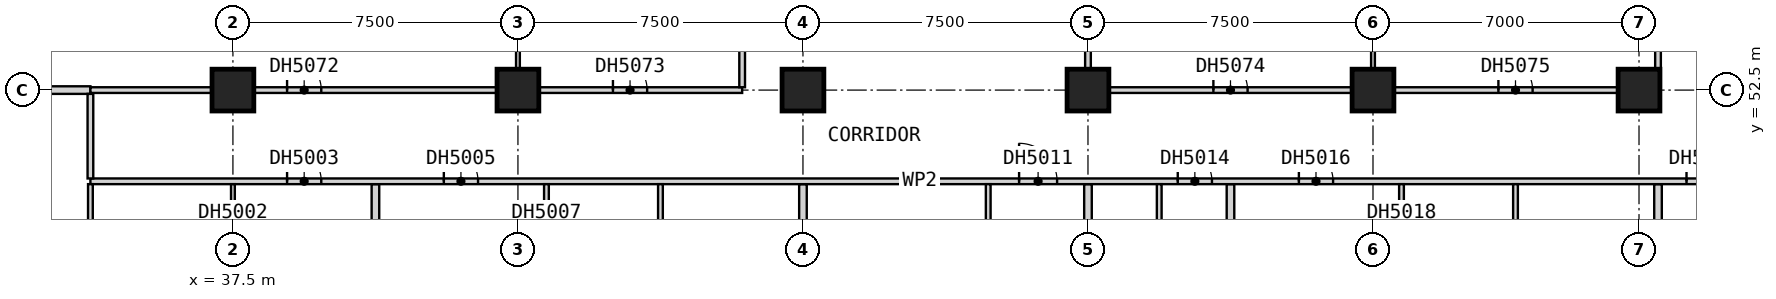
"""IFC4 building model, lengths in metres.
Left out: names, types, materials, properties, quantities, classifications, styles, units other than length and angle.
Written with IfcOpenShell. Run it as: python <this file> out.ifc"""

import sys

from ifc_helpers import new_model, si_unit, direction, frame, frame_2d, origin, origin_2d, place, context, subcontext, project, spatial, rectangle, extrude, element, fill, save


model = new_model("IFC4")
c1 = context("Model", 3, precision=1e-05, world=origin(), true_north=direction((0.0, 1.0)))
c2 = subcontext(c1, "Body", "Model", "MODEL_VIEW")
j1 = project(units=[si_unit("LENGTHUNIT", "METRE"), si_unit("PLANEANGLEUNIT", "RADIAN")], contexts=[c1])
p1 = place(None, origin())
s1 = spatial("IfcSite", under=j1, at=p1, CompositionType="ELEMENT")
p2 = place(p1, origin())
s2 = spatial("IfcBuilding", under=s1, at=p2, CompositionType="ELEMENT")
p3 = place(p2, frame((0.0, 0.0, 93.5)))
s3 = spatial("IfcBuildingStorey", under=s2, at=p3, CompositionType="ELEMENT", Elevation=93.5)
for number, where, z_axis, x_axis in (
    (1, (37.5, 52.5, 0.0), (0.0, 0.0, 1.0), (1.0, 0.0, 0.0)),
    (2, (45.0, 52.5, 0.0), (0.0, 0.0, 1.0), (1.0, 0.0, 0.0)),
    (3, (52.5, 52.5, 0.0), (0.0, 0.0, 1.0), (1.0, 0.0, 0.0)),
    (4, (60.0, 52.5, 0.0), (0.0, 0.0, 1.0), (1.0, 0.0, 0.0)),
    (5, (67.5, 52.5, 0.0), (0.0, 0.0, 1.0), (1.0, 0.0, 0.0)),
    (6, (74.5, 52.5, 0.0), (0.0, 0.0, 1.0), (1.0, 0.0, 0.0)),
):
    element("IfcColumn", number, at=place(p3, frame(where, z_axis=z_axis, x_axis=x_axis)), inside=s3, PredefinedType="COLUMN", context=c2, shape_type="SweptSolid", body=[
        extrude(rectangle(XDim=1.1, YDim=1.1, at=origin_2d()), origin(), (0.0, 0.0, 1.0), 3.6),
    ])
p4 = place(p3, frame((30.0, 52.5, 0.0), z_axis=(0.0, 0.0, 1.0), x_axis=(1.0, 0.0, 0.0)))
e7 = element("IfcWall", 7, at=p4, inside=s3, PredefinedType="PARTITIONING", context=c2, shape_type="SweptSolid", body=[
    extrude(rectangle(XDim=3.75, YDim=0.2, at=frame_2d((1.875, 0.0))), origin(), (0.0, 0.0, 1.0), 3.35),
])
p5 = place(p3, frame((41.25, 38.31, 0.0), z_axis=(0.0, 0.0, 1.0), x_axis=(0.0, 1.0, 0.0)))
e8 = element("IfcWall", 8, at=p5, inside=s3, PredefinedType="PARTITIONING", context=c2, shape_type="SweptSolid", body=[
    extrude(rectangle(XDim=11.715, YDim=0.2, at=frame_2d((5.857, 0.0))), origin(), (0.0, 0.0, 1.0), 3.35),
])
for number, where, z_axis, x_axis in (
    (9, (52.5, 37.5, 0.0), (0.0, 0.0, 1.0), (0.0, 1.0, 0.0)),
    (10, (60.0, 37.5, 0.0), (0.0, 0.0, 1.0), (0.0, 1.0, 0.0)),
):
    element("IfcWall", number, at=place(p3, frame(where, z_axis=z_axis, x_axis=x_axis)), inside=s3, PredefinedType="PARTITIONING", context=c2, shape_type="SweptSolid", body=[
        extrude(rectangle(XDim=12.525, YDim=0.2, at=frame_2d((6.262, 0.0))), origin(), (0.0, 0.0, 1.0), 3.35),
    ])
for number, where, z_axis, x_axis in (
    (11, (63.75, 38.31, 0.0), (0.0, 0.0, 1.0), (0.0, 1.0, 0.0)),
    (12, (75.0, 38.31, 0.0), (0.0, 0.0, 1.0), (0.0, 1.0, 0.0)),
):
    element("IfcWall", number, at=place(p3, frame(where, z_axis=z_axis, x_axis=x_axis)), inside=s3, PredefinedType="PARTITIONING", context=c2, shape_type="SweptSolid", body=[
        extrude(rectangle(XDim=11.715, YDim=0.2, at=frame_2d((5.857, 0.0))), origin(), (0.0, 0.0, 1.0), 3.35),
    ])
p6 = place(p3, frame((33.75, 50.1, 0.0), z_axis=(0.0, 0.0, 1.0), x_axis=(1.0, 0.0, 0.0)))
e13 = element("IfcWall", 13, at=p6, inside=s3, PredefinedType="PARTITIONING", context=c2, shape_type="SweptSolid", body=[
    extrude(rectangle(XDim=43.65, YDim=0.15, at=frame_2d((21.825, 0.0))), origin(), (0.0, 0.0, 1.0), 3.35),
])
p7 = place(p6, frame((5.175, 0.0, 0.0)))
e14 = element("IfcOpeningElement", 14, at=p7, cuts=e13, PredefinedType="OPENING", context=c2, shape_type="SweptSolid", body=[
    extrude(rectangle(XDim=0.9, YDim=2.1, at=frame_2d((0.45, 1.05))), frame((0.0, 0.085, 0.0), z_axis=(0.0, -1.0, 0.0), x_axis=(1.0, 0.0, 0.0)), (0.0, 0.0, 1.0), 0.17),
])
p8 = place(p6, frame((9.3, 0.0, 0.0)))
e15 = element("IfcOpeningElement", 15, at=p8, cuts=e13, PredefinedType="OPENING", context=c2, shape_type="SweptSolid", body=[
    extrude(rectangle(XDim=0.9, YDim=2.1, at=frame_2d((0.45, 1.05))), frame((0.0, 0.085, 0.0), z_axis=(0.0, -1.0, 0.0), x_axis=(1.0, 0.0, 0.0)), (0.0, 0.0, 1.0), 0.17),
])
p9 = place(p6, frame((24.438, 0.0, 0.0)))
e16 = element("IfcOpeningElement", 16, at=p9, cuts=e13, PredefinedType="OPENING", context=c2, shape_type="SweptSolid", body=[
    extrude(rectangle(XDim=1.0, YDim=2.1, at=frame_2d((0.5, 1.05))), frame((0.0, 0.085, 0.0), z_axis=(0.0, -1.0, 0.0), x_axis=(1.0, 0.0, 0.0)), (0.0, 0.0, 1.0), 0.17),
])
p10 = place(p6, frame((28.613, 0.0, 0.0)))
e17 = element("IfcOpeningElement", 17, at=p10, cuts=e13, PredefinedType="OPENING", context=c2, shape_type="SweptSolid", body=[
    extrude(rectangle(XDim=0.9, YDim=2.1, at=frame_2d((0.45, 1.05))), frame((0.0, 0.085, 0.0), z_axis=(0.0, -1.0, 0.0), x_axis=(1.0, 0.0, 0.0)), (0.0, 0.0, 1.0), 0.17),
])
p11 = place(p6, frame((31.8, 0.0, 0.0)))
e18 = element("IfcOpeningElement", 18, at=p11, cuts=e13, PredefinedType="OPENING", context=c2, shape_type="SweptSolid", body=[
    extrude(rectangle(XDim=0.9, YDim=2.1, at=frame_2d((0.45, 1.05))), frame((0.0, 0.085, 0.0), z_axis=(0.0, -1.0, 0.0), x_axis=(1.0, 0.0, 0.0)), (0.0, 0.0, 1.0), 0.17),
])
p12 = place(p6, frame((42.0, 0.0, 0.0)))
e19 = element("IfcOpeningElement", 19, at=p12, cuts=e13, PredefinedType="OPENING", context=c2, shape_type="SweptSolid", body=[
    extrude(rectangle(XDim=0.9, YDim=2.1, at=frame_2d((0.45, 1.05))), frame((0.0, 0.085, 0.0), z_axis=(0.0, -1.0, 0.0), x_axis=(1.0, 0.0, 0.0)), (0.0, 0.0, 1.0), 0.17),
])
p13 = place(p3, frame((33.75, 52.5, 0.0), z_axis=(0.0, 0.0, 1.0), x_axis=(1.0, 0.0, 0.0)))
e20 = element("IfcWall", 20, at=p13, inside=s3, PredefinedType="PARTITIONING", context=c2, shape_type="SweptSolid", body=[
    extrude(rectangle(XDim=17.15, YDim=0.15, at=frame_2d((8.575, 0.0))), origin(), (0.0, 0.0, 1.0), 3.35),
])
p14 = place(p13, frame((5.175, 0.0, 0.0)))
e21 = element("IfcOpeningElement", 21, at=p14, cuts=e20, PredefinedType="OPENING", context=c2, shape_type="SweptSolid", body=[
    extrude(rectangle(XDim=0.9, YDim=2.1, at=frame_2d((0.45, 1.05))), frame((0.0, 0.085, 0.0), z_axis=(0.0, -1.0, 0.0), x_axis=(1.0, 0.0, 0.0)), (0.0, 0.0, 1.0), 0.17),
])
p15 = place(p13, frame((13.75, 0.0, 0.0)))
e22 = element("IfcOpeningElement", 22, at=p15, cuts=e20, PredefinedType="OPENING", context=c2, shape_type="SweptSolid", body=[
    extrude(rectangle(XDim=0.9, YDim=2.1, at=frame_2d((0.45, 1.05))), frame((0.0, 0.085, 0.0), z_axis=(0.0, -1.0, 0.0), x_axis=(1.0, 0.0, 0.0)), (0.0, 0.0, 1.0), 0.17),
])
p16 = place(p3, frame((60.0, 52.5, 0.0), z_axis=(0.0, 0.0, 1.0), x_axis=(1.0, 0.0, 0.0)))
e23 = element("IfcWall", 23, at=p16, inside=s3, PredefinedType="PARTITIONING", context=c2, shape_type="SweptSolid", body=[
    extrude(rectangle(XDim=15.0, YDim=0.15, at=frame_2d((7.5, 0.0))), origin(), (0.0, 0.0, 1.0), 3.35),
])
p17 = place(p16, frame((3.3, 0.0, 0.0)))
e24 = element("IfcOpeningElement", 24, at=p17, cuts=e23, PredefinedType="OPENING", context=c2, shape_type="SweptSolid", body=[
    extrude(rectangle(XDim=0.9, YDim=2.1, at=frame_2d((0.45, 1.05))), frame((0.0, 0.085, 0.0), z_axis=(0.0, -1.0, 0.0), x_axis=(1.0, 0.0, 0.0)), (0.0, 0.0, 1.0), 0.17),
])
p18 = place(p16, frame((10.8, 0.0, 0.0)))
e25 = element("IfcOpeningElement", 25, at=p18, cuts=e23, PredefinedType="OPENING", context=c2, shape_type="SweptSolid", body=[
    extrude(rectangle(XDim=0.9, YDim=2.1, at=frame_2d((0.45, 1.05))), frame((0.0, 0.085, 0.0), z_axis=(0.0, -1.0, 0.0), x_axis=(1.0, 0.0, 0.0)), (0.0, 0.0, 1.0), 0.17),
])
p19 = place(p3, frame((33.75, 50.175, 0.0), z_axis=(0.0, 0.0, 1.0), x_axis=(0.0, 1.0, 0.0)))
e26 = element("IfcWall", 26, at=p19, inside=s3, PredefinedType="PARTITIONING", context=c2, shape_type="SweptSolid", body=[
    extrude(rectangle(XDim=2.225, YDim=0.15, at=frame_2d((1.112, 0.0))), origin(), (0.0, 0.0, 1.0), 3.35),
])
p20 = place(p3, frame((75.0, 52.575, 0.0), z_axis=(0.0, 0.0, 1.0), x_axis=(0.0, 1.0, 0.0)))
e27 = element("IfcWall", 27, at=p20, inside=s3, PredefinedType="PARTITIONING", context=c2, shape_type="SweptSolid", body=[
    extrude(rectangle(XDim=11.85, YDim=0.15, at=frame_2d((5.925, 0.0))), origin(), (0.0, 0.0, 1.0), 3.35),
])
p21 = place(p20, frame((9.225, 0.0, 0.0)))
e28 = element("IfcOpeningElement", 28, at=p21, cuts=e27, PredefinedType="OPENING", context=c2, shape_type="SweptSolid", body=[
    extrude(rectangle(XDim=0.9, YDim=2.1, at=frame_2d((0.45, 1.05))), frame((0.0, 0.085, 0.0), z_axis=(0.0, -1.0, 0.0), x_axis=(1.0, 0.0, 0.0)), (0.0, 0.0, 1.0), 0.17),
])
p22 = place(p3, frame((37.5, 45.3, 0.0), z_axis=(0.0, 0.0, 1.0), x_axis=(0.0, 1.0, 0.0)))
e29 = element("IfcWall", 29, at=p22, inside=s3, PredefinedType="PARTITIONING", context=c2, shape_type="SweptSolid", body=[
    extrude(rectangle(XDim=4.725, YDim=0.1, at=frame_2d((2.362, 0.0))), origin(), (0.0, 0.0, 1.0), 3.35),
])
p23 = place(p22, frame((1.925, 0.0, 0.0)))
e30 = element("IfcOpeningElement", 30, at=p23, cuts=e29, PredefinedType="OPENING", context=c2, shape_type="SweptSolid", body=[
    extrude(rectangle(XDim=0.9, YDim=2.1, at=frame_2d((0.45, 1.05))), frame((0.0, 0.06, 0.0), z_axis=(0.0, -1.0, 0.0), x_axis=(1.0, 0.0, 0.0)), (0.0, 0.0, 1.0), 0.12),
])
p24 = place(p3, frame((45.0, 52.575, 0.0), z_axis=(0.0, 0.0, 1.0), x_axis=(0.0, 1.0, 0.0)))
e31 = element("IfcWall", 31, at=p24, inside=s3, PredefinedType="PARTITIONING", context=c2, shape_type="SweptSolid", body=[
    extrude(rectangle(XDim=7.425, YDim=0.1, at=frame_2d((3.712, 0.0))), origin(), (0.0, 0.0, 1.0), 3.35),
])
p25 = place(p3, frame((67.5, 52.575, 0.0), z_axis=(0.0, 0.0, 1.0), x_axis=(0.0, 1.0, 0.0)))
e32 = element("IfcWall", 32, at=p25, inside=s3, PredefinedType="PARTITIONING", context=c2, shape_type="SweptSolid", body=[
    extrude(rectangle(XDim=7.375, YDim=0.1, at=frame_2d((3.688, 0.0))), origin(), (0.0, 0.0, 1.0), 3.35),
])
p26 = place(p3, frame((33.75, 45.312, 0.0), z_axis=(0.0, 0.0, 1.0), x_axis=(0.0, 1.0, 0.0)))
e33 = element("IfcWall", 33, at=p26, inside=s3, PredefinedType="PARTITIONING", context=c2, shape_type="SweptSolid", body=[
    extrude(rectangle(XDim=4.712, YDim=0.125, at=frame_2d((2.356, 0.0))), origin(), (0.0, 0.0, 1.0), 3.35),
])
p27 = place(p3, frame((45.75, 45.312, 0.0), z_axis=(0.0, 0.0, 1.0), x_axis=(0.0, 1.0, 0.0)))
e34 = element("IfcWall", 34, at=p27, inside=s3, PredefinedType="PARTITIONING", context=c2, shape_type="SweptSolid", body=[
    extrude(rectangle(XDim=4.712, YDim=0.125, at=frame_2d((2.356, 0.0))), origin(), (0.0, 0.0, 1.0), 3.35),
])
p28 = place(p27, frame((1.913, 0.0, 0.0)))
e35 = element("IfcOpeningElement", 35, at=p28, cuts=e34, PredefinedType="OPENING", context=c2, shape_type="SweptSolid", body=[
    extrude(rectangle(XDim=0.9, YDim=2.1, at=frame_2d((0.45, 1.05))), frame((0.0, 0.073, 0.0), z_axis=(0.0, -1.0, 0.0), x_axis=(1.0, 0.0, 0.0)), (0.0, 0.0, 1.0), 0.145),
])
for number, where, z_axis, x_axis in (
    (36, (48.75, 45.312, 0.0), (0.0, 0.0, 1.0), (0.0, 1.0, 0.0)),
    (37, (57.375, 45.312, 0.0), (0.0, 0.0, 1.0), (0.0, 1.0, 0.0)),
    (38, (61.875, 45.312, 0.0), (0.0, 0.0, 1.0), (0.0, 1.0, 0.0)),
):
    element("IfcWall", number, at=place(p3, frame(where, z_axis=z_axis, x_axis=x_axis)), inside=s3, PredefinedType="PARTITIONING", context=c2, shape_type="SweptSolid", body=[
        extrude(rectangle(XDim=4.712, YDim=0.125, at=frame_2d((2.356, 0.0))), origin(), (0.0, 0.0, 1.0), 3.35),
    ])
p29 = place(p3, frame((68.25, 45.312, 0.0), z_axis=(0.0, 0.0, 1.0), x_axis=(0.0, 1.0, 0.0)))
e39 = element("IfcWall", 39, at=p29, inside=s3, PredefinedType="PARTITIONING", context=c2, shape_type="SweptSolid", body=[
    extrude(rectangle(XDim=4.712, YDim=0.125, at=frame_2d((2.356, 0.0))), origin(), (0.0, 0.0, 1.0), 3.35),
])
p30 = place(p29, frame((1.913, 0.0, 0.0)))
e40 = element("IfcOpeningElement", 40, at=p30, cuts=e39, PredefinedType="OPENING", context=c2, shape_type="SweptSolid", body=[
    extrude(rectangle(XDim=0.9, YDim=2.1, at=frame_2d((0.45, 1.05))), frame((0.0, 0.073, 0.0), z_axis=(0.0, -1.0, 0.0), x_axis=(1.0, 0.0, 0.0)), (0.0, 0.0, 1.0), 0.145),
])
p31 = place(p3, frame((71.25, 45.312, 0.0), z_axis=(0.0, 0.0, 1.0), x_axis=(0.0, 1.0, 0.0)))
e41 = element("IfcWall", 41, at=p31, inside=s3, PredefinedType="PARTITIONING", context=c2, shape_type="SweptSolid", body=[
    extrude(rectangle(XDim=4.712, YDim=0.125, at=frame_2d((2.356, 0.0))), origin(), (0.0, 0.0, 1.0), 3.35),
])
for number, where, z_axis, x_axis in (
    (42, (50.9, 52.575, 0.0), (0.0, 0.0, 1.0), (0.0, 1.0, 0.0)),
    (43, (60.0, 52.575, 0.0), (0.0, 0.0, 1.0), (0.0, 1.0, 0.0)),
):
    element("IfcWall", number, at=place(p3, frame(where, z_axis=z_axis, x_axis=x_axis)), inside=s3, PredefinedType="PARTITIONING", context=c2, shape_type="SweptSolid", body=[
        extrude(rectangle(XDim=7.425, YDim=0.15, at=frame_2d((3.712, 0.0))), origin(), (0.0, 0.0, 1.0), 3.35),
    ])
p32 = place(p7, origin())
e44 = element("IfcDoor", 44, at=p32, inside=s3, OperationType="SINGLE_SWING_RIGHT", PredefinedType="DOOR", context=c2, shape_type="SweptSolid", body=[
    extrude(rectangle(XDim=0.9, YDim=2.1, at=frame_2d((0.45, 1.05))), frame((0.0, 0.025, 0.0), z_axis=(0.0, -1.0, 0.0), x_axis=(1.0, 0.0, 0.0)), (0.0, 0.0, 1.0), 0.05),
])
fill(e14, e44)
p33 = place(p8, origin())
e45 = element("IfcDoor", 45, at=p33, inside=s3, OperationType="SINGLE_SWING_RIGHT", PredefinedType="DOOR", context=c2, shape_type="SweptSolid", body=[
    extrude(rectangle(XDim=0.9, YDim=2.1, at=frame_2d((0.45, 1.05))), frame((0.0, 0.025, 0.0), z_axis=(0.0, -1.0, 0.0), x_axis=(1.0, 0.0, 0.0)), (0.0, 0.0, 1.0), 0.05),
])
fill(e15, e45)
p34 = place(p9, origin())
e46 = element("IfcDoor", 46, at=p34, inside=s3, OperationType="SINGLE_SWING_RIGHT", PredefinedType="DOOR", context=c2, shape_type="SweptSolid", body=[
    extrude(rectangle(XDim=1.0, YDim=2.1, at=frame_2d((0.5, 1.05))), frame((0.0, 0.025, 0.0), z_axis=(0.0, -1.0, 0.0), x_axis=(1.0, 0.0, 0.0)), (0.0, 0.0, 1.0), 0.05),
])
fill(e16, e46)
p35 = place(p10, origin())
e47 = element("IfcDoor", 47, at=p35, inside=s3, OperationType="SINGLE_SWING_RIGHT", PredefinedType="DOOR", context=c2, shape_type="SweptSolid", body=[
    extrude(rectangle(XDim=0.9, YDim=2.1, at=frame_2d((0.45, 1.05))), frame((0.0, 0.025, 0.0), z_axis=(0.0, -1.0, 0.0), x_axis=(1.0, 0.0, 0.0)), (0.0, 0.0, 1.0), 0.05),
])
fill(e17, e47)
p36 = place(p11, origin())
e48 = element("IfcDoor", 48, at=p36, inside=s3, OperationType="SINGLE_SWING_RIGHT", PredefinedType="DOOR", context=c2, shape_type="SweptSolid", body=[
    extrude(rectangle(XDim=0.9, YDim=2.1, at=frame_2d((0.45, 1.05))), frame((0.0, 0.025, 0.0), z_axis=(0.0, -1.0, 0.0), x_axis=(1.0, 0.0, 0.0)), (0.0, 0.0, 1.0), 0.05),
])
fill(e18, e48)
p37 = place(p12, origin())
e49 = element("IfcDoor", 49, at=p37, inside=s3, OperationType="SINGLE_SWING_LEFT", PredefinedType="DOOR", context=c2, shape_type="SweptSolid", body=[
    extrude(rectangle(XDim=0.9, YDim=2.1, at=frame_2d((0.45, 1.05))), frame((0.0, 0.025, 0.0), z_axis=(0.0, -1.0, 0.0), x_axis=(1.0, 0.0, 0.0)), (0.0, 0.0, 1.0), 0.05),
])
fill(e19, e49)
p38 = place(p14, origin())
e50 = element("IfcDoor", 50, at=p38, inside=s3, OperationType="SINGLE_SWING_LEFT", PredefinedType="DOOR", context=c2, shape_type="SweptSolid", body=[
    extrude(rectangle(XDim=0.9, YDim=2.1, at=frame_2d((0.45, 1.05))), frame((0.0, 0.025, 0.0), z_axis=(0.0, -1.0, 0.0), x_axis=(1.0, 0.0, 0.0)), (0.0, 0.0, 1.0), 0.05),
])
fill(e21, e50)
p39 = place(p15, origin())
e51 = element("IfcDoor", 51, at=p39, inside=s3, OperationType="SINGLE_SWING_LEFT", PredefinedType="DOOR", context=c2, shape_type="SweptSolid", body=[
    extrude(rectangle(XDim=0.9, YDim=2.1, at=frame_2d((0.45, 1.05))), frame((0.0, 0.025, 0.0), z_axis=(0.0, -1.0, 0.0), x_axis=(1.0, 0.0, 0.0)), (0.0, 0.0, 1.0), 0.05),
])
fill(e22, e51)
p40 = place(p17, origin())
e52 = element("IfcDoor", 52, at=p40, inside=s3, OperationType="SINGLE_SWING_LEFT", PredefinedType="DOOR", context=c2, shape_type="SweptSolid", body=[
    extrude(rectangle(XDim=0.9, YDim=2.1, at=frame_2d((0.45, 1.05))), frame((0.0, 0.025, 0.0), z_axis=(0.0, -1.0, 0.0), x_axis=(1.0, 0.0, 0.0)), (0.0, 0.0, 1.0), 0.05),
])
fill(e24, e52)
p41 = place(p18, origin())
e53 = element("IfcDoor", 53, at=p41, inside=s3, OperationType="SINGLE_SWING_LEFT", PredefinedType="DOOR", context=c2, shape_type="SweptSolid", body=[
    extrude(rectangle(XDim=0.9, YDim=2.1, at=frame_2d((0.45, 1.05))), frame((0.0, 0.025, 0.0), z_axis=(0.0, -1.0, 0.0), x_axis=(1.0, 0.0, 0.0)), (0.0, 0.0, 1.0), 0.05),
])
fill(e25, e53)
save(model, sys.argv[1])
